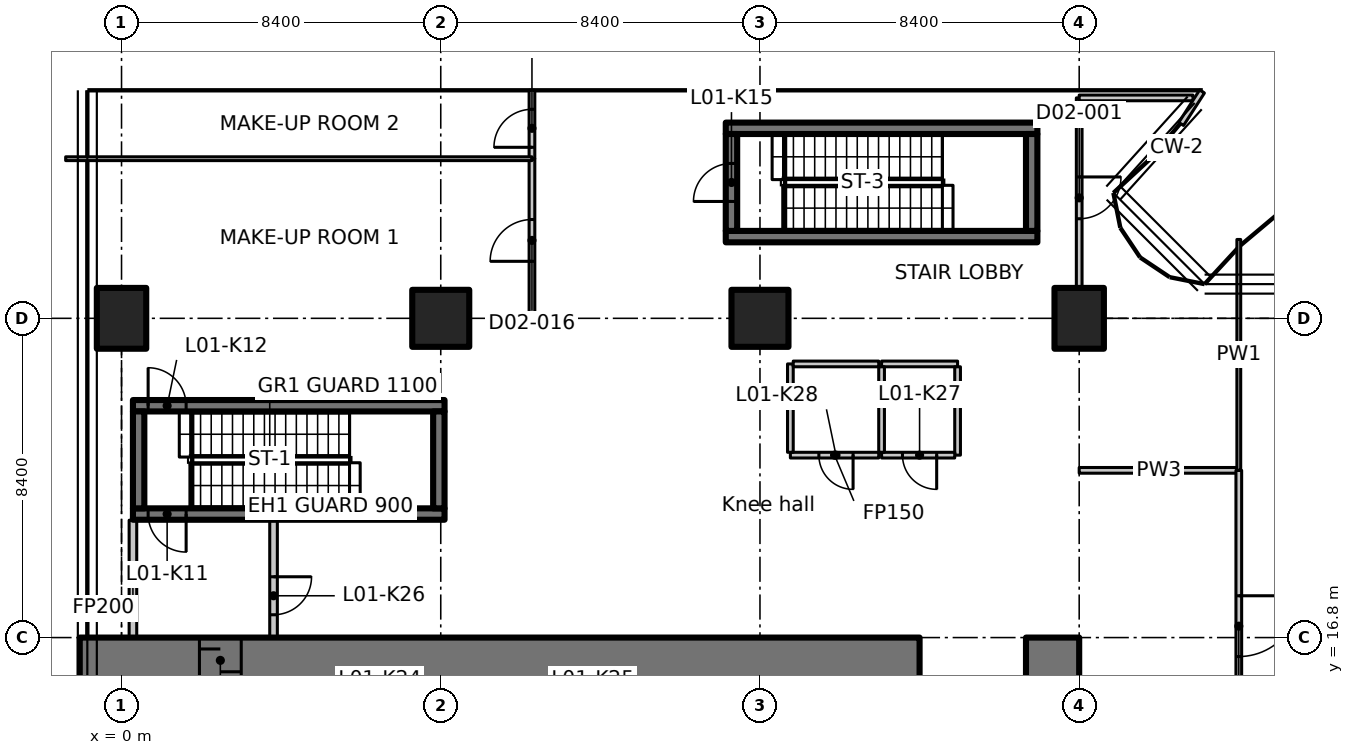
"""IFC4 building model, lengths in metres.
Left out: names, types, materials, properties, quantities, classifications, styles, units other than length and angle.
Written with IfcOpenShell. Run it as: python <this file> out.ifc"""

import sys

from ifc_helpers import new_model, si_unit, direction, frame, frame_2d, origin, origin_2d, place, context, subcontext, project, spatial, polyline, rectangle, outline, extrude, element, fill, save


model = new_model("IFC4")
c1 = context("Model", 3, precision=1e-05, world=origin(), true_north=direction((0.0, 1.0)))
c2 = subcontext(c1, "Body", "Model", "MODEL_VIEW")
j1 = project(units=[si_unit("LENGTHUNIT", "METRE"), si_unit("PLANEANGLEUNIT", "RADIAN")], contexts=[c1])
p1 = place(None, origin())
s1 = spatial("IfcSite", under=j1, at=p1, CompositionType="ELEMENT")
p2 = place(p1, origin())
s2 = spatial("IfcBuilding", under=s1, at=p2, CompositionType="ELEMENT")
p3 = place(p2, frame((0.0, 0.0, 7.0)))
s3 = spatial("IfcBuildingStorey", under=s2, at=p3, CompositionType="ELEMENT", Elevation=7.0)
p4 = place(p3, frame((0.0, 25.2, 0.0), z_axis=(0.0, 0.0, 1.0), x_axis=(1.0, 0.0, 0.0)))
e1 = element("IfcColumn", 1, at=p4, inside=s3, PredefinedType="COLUMN", context=c2, shape_type="SweptSolid", body=[
    extrude(rectangle(XDim=1.3, YDim=1.6, at=origin_2d()), origin(), (0.0, 0.0, 1.0), 5.25),
])
for number, where, z_axis, x_axis in (
    (2, (8.4, 25.2, 0.0), (0.0, 0.0, 1.0), (1.0, 0.0, 0.0)),
    (3, (16.8, 25.2, 0.0), (0.0, 0.0, 1.0), (1.0, 0.0, 0.0)),
):
    element("IfcColumn", number, at=place(p3, frame(where, z_axis=z_axis, x_axis=x_axis)), inside=s3, PredefinedType="COLUMN", context=c2, shape_type="SweptSolid", body=[
        extrude(rectangle(XDim=1.5, YDim=1.5, at=origin_2d()), origin(), (0.0, 0.0, 1.0), 5.25),
    ])
p5 = place(p3, frame((25.2, 25.2, 0.0), z_axis=(0.0, 0.0, 1.0), x_axis=(1.0, 0.0, 0.0)))
e4 = element("IfcColumn", 4, at=p5, inside=s3, PredefinedType="COLUMN", context=c2, shape_type="SweptSolid", body=[
    extrude(rectangle(XDim=1.3, YDim=1.6, at=origin_2d()), origin(), (0.0, 0.0, 1.0), 5.25),
])
p6 = place(p2, origin())
s4 = spatial("IfcBuildingStorey", under=s2, at=p6, CompositionType="ELEMENT", Elevation=0.0)
for number, where, z_axis, x_axis in (
    (5, (0.6, 32.4, -6.3), (0.0, 0.0, 1.0), (1.0, 0.0, 0.0)),
    (6, (9.0, 32.4, -6.3), (0.0, 0.0, 1.0), (1.0, 0.0, 0.0)),
):
    element("IfcWall", number, at=place(p6, frame(where, z_axis=z_axis, x_axis=x_axis)), inside=s4, PredefinedType="SOLIDWALL", context=c2, shape_type="SweptSolid", body=[
        extrude(rectangle(XDim=7.2, YDim=2.4, at=frame_2d((3.6, 0.0))), origin(), (0.0, 0.0, 1.0), 42.55),
    ])
p7 = place(p6, frame((17.4, 32.4, -6.3), z_axis=(0.0, 0.0, 1.0), x_axis=(1.0, 0.0, 0.0)))
e7 = element("IfcWall", 7, at=p7, inside=s4, PredefinedType="SOLIDWALL", context=c2, shape_type="SweptSolid", body=[
    extrude(rectangle(XDim=7.2, YDim=2.4, at=frame_2d((3.6, 0.0))), origin(), (0.0, 0.0, 1.0), 42.55),
])
p8 = place(p3, frame((-1.1, 16.2, 0.0), z_axis=(0.0, 0.0, 1.0), x_axis=(1.0, 0.0, 0.0)))
e8 = element("IfcWall", 8, at=p8, inside=s3, PredefinedType="SHEAR", context=c2, shape_type="SweptSolid", body=[
    extrude(rectangle(XDim=22.1, YDim=1.2, at=frame_2d((11.05, 0.0))), origin(), (0.0, 0.0, 1.0), 5.25),
])
p9 = place(p8, frame((3.15, 0.0, 0.0)))
e9 = element("IfcOpeningElement", 9, at=p9, cuts=e8, PredefinedType="OPENING", context=c2, shape_type="SweptSolid", body=[
    extrude(rectangle(XDim=1.1, YDim=2.3, at=frame_2d((0.55, 1.15))), frame((0.0, 0.61, 0.0), z_axis=(0.0, -1.0, 0.0), x_axis=(1.0, 0.0, 0.0)), (0.0, 0.0, 1.0), 1.22),
])
p10 = place(p3, frame((23.8, 16.2, 0.0), z_axis=(0.0, 0.0, 1.0), x_axis=(1.0, 0.0, 0.0)))
e10 = element("IfcWall", 10, at=p10, inside=s3, PredefinedType="SHEAR", context=c2, shape_type="SweptSolid", body=[
    extrude(rectangle(XDim=1.4, YDim=1.2, at=frame_2d((0.7, 0.0))), origin(), (0.0, 0.0, 1.0), 5.25),
])
p11 = place(p3, frame((8.5, 20.05, 0.0), z_axis=(0.0, 0.0, 1.0), x_axis=(-1.0, 0.0, 0.0)))
e11 = element("IfcWall", 11, at=p11, inside=s3, PredefinedType="SHEAR", context=c2, shape_type="SweptSolid", body=[
    extrude(rectangle(XDim=8.2, YDim=0.3, at=frame_2d((4.1, 0.0))), origin(), (0.0, 0.0, 1.0), 5.25),
])
p12 = place(p11, frame((6.8, 0.0, 0.0)))
e12 = element("IfcOpeningElement", 12, at=p12, cuts=e11, PredefinedType="OPENING", context=c2, shape_type="SweptSolid", body=[
    extrude(rectangle(XDim=1.0, YDim=2.1, at=frame_2d((0.5, 1.05))), frame((0.0, 0.16, 0.0), z_axis=(0.0, -1.0, 0.0), x_axis=(1.0, 0.0, 0.0)), (0.0, 0.0, 1.0), 0.32),
])
p13 = place(p3, frame((0.3, 22.9, 0.0), z_axis=(0.0, 0.0, 1.0), x_axis=(1.0, 0.0, 0.0)))
e13 = element("IfcWall", 13, at=p13, inside=s3, PredefinedType="SHEAR", context=c2, shape_type="SweptSolid", body=[
    extrude(rectangle(XDim=8.2, YDim=0.3, at=frame_2d((4.1, 0.0))), origin(), (0.0, 0.0, 1.0), 5.25),
])
p14 = place(p13, frame((0.4, 0.0, 0.0)))
e14 = element("IfcOpeningElement", 14, at=p14, cuts=e13, PredefinedType="OPENING", context=c2, shape_type="SweptSolid", body=[
    extrude(rectangle(XDim=1.0, YDim=2.1, at=frame_2d((0.5, 1.05))), frame((0.0, 0.16, 0.0), z_axis=(0.0, -1.0, 0.0), x_axis=(1.0, 0.0, 0.0)), (0.0, 0.0, 1.0), 0.32),
])
for number, where, z_axis, x_axis in (
    (15, (0.45, 20.2, 0.0), (0.0, 0.0, 1.0), (0.0, 1.0, 0.0)),
    (16, (8.35, 20.2, 0.0), (0.0, 0.0, 1.0), (0.0, 1.0, 0.0)),
):
    element("IfcWall", number, at=place(p3, frame(where, z_axis=z_axis, x_axis=x_axis)), inside=s3, PredefinedType="SHEAR", context=c2, shape_type="SweptSolid", body=[
        extrude(rectangle(XDim=2.55, YDim=0.3, at=frame_2d((1.275, 0.0))), origin(), (0.0, 0.0, 1.0), 5.25),
    ])
for number, where, z_axis, x_axis in (
    (17, (15.9, 27.35, 0.0), (0.0, 0.0, 1.0), (1.0, 0.0, 0.0)),
    (18, (15.9, 30.2, 0.0), (0.0, 0.0, 1.0), (1.0, 0.0, 0.0)),
):
    element("IfcWall", number, at=place(p3, frame(where, z_axis=z_axis, x_axis=x_axis)), inside=s3, PredefinedType="SHEAR", context=c2, shape_type="SweptSolid", body=[
        extrude(rectangle(XDim=8.2, YDim=0.3, at=frame_2d((4.1, 0.0))), origin(), (0.0, 0.0, 1.0), 5.25),
    ])
p15 = place(p3, frame((16.05, 27.5, 0.0), z_axis=(0.0, 0.0, 1.0), x_axis=(0.0, 1.0, 0.0)))
e19 = element("IfcWall", 19, at=p15, inside=s3, PredefinedType="SHEAR", context=c2, shape_type="SweptSolid", body=[
    extrude(rectangle(XDim=2.55, YDim=0.3, at=frame_2d((1.275, 0.0))), origin(), (0.0, 0.0, 1.0), 5.25),
])
p16 = place(p15, frame((0.775, 0.0, 0.0)))
e20 = element("IfcOpeningElement", 20, at=p16, cuts=e19, PredefinedType="OPENING", context=c2, shape_type="SweptSolid", body=[
    extrude(rectangle(XDim=1.0, YDim=2.1, at=frame_2d((0.5, 1.05))), frame((0.0, 0.16, 0.0), z_axis=(0.0, -1.0, 0.0), x_axis=(1.0, 0.0, 0.0)), (0.0, 0.0, 1.0), 0.32),
])
p17 = place(p3, frame((23.95, 27.5, 0.0), z_axis=(0.0, 0.0, 1.0), x_axis=(0.0, 1.0, 0.0)))
e21 = element("IfcWall", 21, at=p17, inside=s3, PredefinedType="SHEAR", context=c2, shape_type="SweptSolid", body=[
    extrude(rectangle(XDim=2.55, YDim=0.3, at=frame_2d((1.275, 0.0))), origin(), (0.0, 0.0, 1.0), 5.25),
])
p18 = place(p3, frame((0.3, 16.812, 0.0), z_axis=(0.0, 0.0, 1.0), x_axis=(0.0, 1.0, 0.0)))
e22 = element("IfcWall", 22, at=p18, inside=s3, PredefinedType="PARTITIONING", context=c2, shape_type="SweptSolid", body=[
    extrude(rectangle(XDim=3.076, YDim=0.2, at=frame_2d((1.538, 0.0))), origin(), (0.0, 0.0, 1.0), 4.88),
])
p19 = place(p3, frame((4.0, 19.888, 0.0), z_axis=(0.0, 0.0, 1.0), x_axis=(0.0, -1.0, 0.0)))
e23 = element("IfcWall", 23, at=p19, inside=s3, PredefinedType="PARTITIONING", context=c2, shape_type="SweptSolid", body=[
    extrude(rectangle(XDim=3.076, YDim=0.2, at=frame_2d((1.538, 0.0))), origin(), (0.0, 0.0, 1.0), 5.25),
])
p20 = place(p19, frame((1.488, 0.0, 0.0)))
e24 = element("IfcOpeningElement", 24, at=p20, cuts=e23, PredefinedType="OPENING", context=c2, shape_type="SweptSolid", body=[
    extrude(rectangle(XDim=1.0, YDim=2.1, at=frame_2d((0.5, 1.05))), frame((0.0, 0.11, 0.0), z_axis=(0.0, -1.0, 0.0), x_axis=(1.0, 0.0, 0.0)), (0.0, 0.0, 1.0), 0.22),
])
p21 = place(p3, frame((20.0, 24.0, 0.0), z_axis=(0.0, 0.0, 1.0), x_axis=(1.0, 0.0, 0.0)))
e25 = element("IfcWall", 25, at=p21, inside=s3, PredefinedType="PARTITIONING", context=c2, shape_type="SweptSolid", body=[
    extrude(rectangle(XDim=2.0, YDim=0.15, at=frame_2d((1.0, 0.0))), origin(), (0.0, 0.0, 1.0), 5.25),
])
p22 = place(p3, frame((22.0, 23.925, 0.0), z_axis=(0.0, 0.0, 1.0), x_axis=(0.0, -1.0, 0.0)))
e26 = element("IfcWall", 26, at=p22, inside=s3, PredefinedType="PARTITIONING", context=c2, shape_type="SweptSolid", body=[
    extrude(rectangle(XDim=2.325, YDim=0.15, at=frame_2d((1.163, 0.0))), origin(), (0.0, 0.0, 1.0), 5.25),
])
p23 = place(p3, frame((21.925, 21.6, 0.0), z_axis=(0.0, 0.0, 1.0), x_axis=(-1.0, 0.0, 0.0)))
e27 = element("IfcWall", 27, at=p23, inside=s3, PredefinedType="PARTITIONING", context=c2, shape_type="SweptSolid", body=[
    extrude(rectangle(XDim=1.925, YDim=0.15, at=frame_2d((0.962, 0.0))), origin(), (0.0, 0.0, 1.0), 5.25),
])
p24 = place(p23, frame((0.475, 0.0, 0.0)))
e28 = element("IfcOpeningElement", 28, at=p24, cuts=e27, PredefinedType="OPENING", context=c2, shape_type="SweptSolid", body=[
    extrude(rectangle(XDim=0.9, YDim=2.1, at=frame_2d((0.45, 1.05))), frame((0.0, 0.085, 0.0), z_axis=(0.0, -1.0, 0.0), x_axis=(1.0, 0.0, 0.0)), (0.0, 0.0, 1.0), 0.17),
])
p25 = place(p3, frame((20.0, 21.675, 0.0), z_axis=(0.0, 0.0, 1.0), x_axis=(0.0, 1.0, 0.0)))
e29 = element("IfcWall", 29, at=p25, inside=s3, PredefinedType="PARTITIONING", context=c2, shape_type="SweptSolid", body=[
    extrude(rectangle(XDim=2.25, YDim=0.15, at=frame_2d((1.125, 0.0))), origin(), (0.0, 0.0, 1.0), 5.25),
])
p26 = place(p3, frame((19.925, 21.6, 0.0), z_axis=(0.0, 0.0, 1.0), x_axis=(-1.0, 0.0, 0.0)))
e30 = element("IfcWall", 30, at=p26, inside=s3, PredefinedType="PARTITIONING", context=c2, shape_type="SweptSolid", body=[
    extrude(rectangle(XDim=2.325, YDim=0.15, at=frame_2d((1.163, 0.0))), origin(), (0.0, 0.0, 1.0), 5.25),
])
p27 = place(p26, frame((0.675, 0.0, 0.0)))
e31 = element("IfcOpeningElement", 31, at=p27, cuts=e30, PredefinedType="OPENING", context=c2, shape_type="SweptSolid", body=[
    extrude(rectangle(XDim=0.9, YDim=2.1, at=frame_2d((0.45, 1.05))), frame((0.0, 0.085, 0.0), z_axis=(0.0, -1.0, 0.0), x_axis=(1.0, 0.0, 0.0)), (0.0, 0.0, 1.0), 0.17),
])
p28 = place(p3, frame((17.6, 21.675, 0.0), z_axis=(0.0, 0.0, 1.0), x_axis=(0.0, 1.0, 0.0)))
e32 = element("IfcWall", 32, at=p28, inside=s3, PredefinedType="PARTITIONING", context=c2, shape_type="SweptSolid", body=[
    extrude(rectangle(XDim=2.325, YDim=0.15, at=frame_2d((1.163, 0.0))), origin(), (0.0, 0.0, 1.0), 5.25),
])
p29 = place(p3, frame((17.675, 24.0, 0.0), z_axis=(0.0, 0.0, 1.0), x_axis=(1.0, 0.0, 0.0)))
e33 = element("IfcWall", 33, at=p29, inside=s3, PredefinedType="PARTITIONING", context=c2, shape_type="SweptSolid", body=[
    extrude(rectangle(XDim=2.25, YDim=0.15, at=frame_2d((1.125, 0.0))), origin(), (0.0, 0.0, 1.0), 5.25),
])
p30 = place(p3, frame((25.2, 21.2, 0.0), z_axis=(0.0, 0.0, 1.0), x_axis=(1.0, 0.0, 0.0)))
e34 = element("IfcWall", 34, at=p30, inside=s3, PredefinedType="PARTITIONING", context=c2, shape_type="SweptSolid", body=[
    extrude(rectangle(XDim=4.2, YDim=0.15, at=frame_2d((2.1, 0.0))), origin(), (0.0, 0.0, 1.0), 5.23),
])
p31 = place(p3, frame((29.4, 21.2, 0.0), z_axis=(0.0, 0.0, 1.0), x_axis=(0.0, -1.0, 0.0)))
e35 = element("IfcWall", 35, at=p31, inside=s3, PredefinedType="PARTITIONING", context=c2, shape_type="SweptSolid", body=[
    extrude(rectangle(XDim=8.2, YDim=0.15, at=frame_2d((4.1, 0.0))), origin(), (0.0, 0.0, 1.0), 5.23),
])
p32 = place(p31, frame((3.3, 0.0, 0.0)))
e36 = element("IfcOpeningElement", 36, at=p32, cuts=e35, PredefinedType="OPENING", context=c2, shape_type="SweptSolid", body=[
    extrude(rectangle(XDim=1.6, YDim=2.1, at=frame_2d((0.8, 1.05))), frame((0.0, 0.085, 0.0), z_axis=(0.0, -1.0, 0.0), x_axis=(1.0, 0.0, 0.0)), (0.0, 0.0, 1.0), 0.17),
])
p33 = place(p3, frame((29.4, 27.275, 0.0), z_axis=(0.0, 0.0, 1.0), x_axis=(0.0, -1.0, 0.0)))
e37 = element("IfcWall", 37, at=p33, inside=s3, PredefinedType="PARTITIONING", context=c2, shape_type="SweptSolid", body=[
    extrude(outline(polyline([(0.0, 0.0), (6.075, 0.0), (6.075, 5.23), (2.525, 5.23), (2.523, 4.88), (1.627, 4.88), (1.625, 5.23), (0.0, 5.23), (0.0, 0.0)])), frame((0.0, 0.05, 0.0), z_axis=(0.0, -1.0, 0.0), x_axis=(1.0, 0.0, 0.0)), (0.0, 0.0, 1.0), 0.1),
])
p34 = place(p3, frame((25.2, 31.0, 0.0), z_axis=(0.0, 0.0, 1.0), x_axis=(0.0, -1.0, 0.0)))
e38 = element("IfcWall", 38, at=p34, inside=s3, PredefinedType="PARTITIONING", context=c2, shape_type="SweptSolid", body=[
    extrude(rectangle(XDim=4.98, YDim=0.15, at=frame_2d((2.49, 0.0))), origin(), (0.0, 0.0, 1.0), 5.23),
])
p35 = place(p34, frame((2.08, 0.0, 0.0)))
e39 = element("IfcOpeningElement", 39, at=p35, cuts=e38, PredefinedType="OPENING", context=c2, shape_type="SweptSolid", body=[
    extrude(rectangle(XDim=1.1, YDim=2.1, at=frame_2d((0.55, 1.05))), frame((0.0, 0.085, 0.0), z_axis=(0.0, -1.0, 0.0), x_axis=(1.0, 0.0, 0.0)), (0.0, 0.0, 1.0), 0.17),
])
p36 = place(p3, frame((25.2, 31.0, 0.0), z_axis=(0.0, 0.0, 1.0), x_axis=(1.0, 0.0, 0.0)))
e40 = element("IfcWall", 40, at=p36, inside=s3, PredefinedType="PARTITIONING", context=c2, shape_type="SweptSolid", body=[
    extrude(rectangle(XDim=2.994, YDim=0.15, at=frame_2d((1.497, 0.0))), origin(), (0.0, 0.0, 1.0), 5.23),
])
p37 = place(p3, frame((28.432, 31.168, 0.0), z_axis=(0.0, 0.0, 1.0), x_axis=(-0.540854867502, -0.841115932734, 0.0)))
e41 = element("IfcWall", 41, at=p37, inside=s3, PredefinedType="PARTITIONING", context=c2, shape_type="SweptSolid", body=[
    extrude(rectangle(XDim=1.015, YDim=0.15, at=frame_2d((0.507, 0.0))), origin(), (0.0, 0.0, 1.0), 5.23),
])
p38 = place(p3, frame((10.8, 25.2, 0.0), z_axis=(0.0, 0.0, 1.0), x_axis=(0.0, 1.0, 0.0)))
e42 = element("IfcWall", 42, at=p38, inside=s3, PredefinedType="PARTITIONING", context=c2, shape_type="SweptSolid", body=[
    extrude(rectangle(XDim=4.2, YDim=0.15, at=frame_2d((2.1, 0.0))), origin(), (0.0, 0.0, 1.0), 5.23),
])
p39 = place(p38, frame((1.5, 0.0, 0.0)))
e43 = element("IfcOpeningElement", 43, at=p39, cuts=e42, PredefinedType="OPENING", context=c2, shape_type="SweptSolid", body=[
    extrude(rectangle(XDim=1.1, YDim=2.1, at=frame_2d((0.55, 1.05))), frame((0.0, 0.085, 0.0), z_axis=(0.0, -1.0, 0.0), x_axis=(1.0, 0.0, 0.0)), (0.0, 0.0, 1.0), 0.17),
])
p40 = place(p3, frame((10.8, 29.4, 0.0), z_axis=(0.0, 0.0, 1.0), x_axis=(0.0, 1.0, 0.0)))
e44 = element("IfcWall", 44, at=p40, inside=s3, PredefinedType="PARTITIONING", context=c2, shape_type="SweptSolid", body=[
    extrude(rectangle(XDim=1.8, YDim=0.15, at=frame_2d((0.9, 0.0))), origin(), (0.0, 0.0, 1.0), 5.23),
])
p41 = place(p40, frame((0.3, 0.0, 0.0)))
e45 = element("IfcOpeningElement", 45, at=p41, cuts=e44, PredefinedType="OPENING", context=c2, shape_type="SweptSolid", body=[
    extrude(rectangle(XDim=1.0, YDim=2.1, at=frame_2d((0.5, 1.05))), frame((0.0, 0.085, 0.0), z_axis=(0.0, -1.0, 0.0), x_axis=(1.0, 0.0, 0.0)), (0.0, 0.0, 1.0), 0.17),
])
p42 = place(p3, frame((-1.47, 29.4, 0.0), z_axis=(0.0, 0.0, 1.0), x_axis=(1.0, 0.0, 0.0)))
e46 = element("IfcWall", 46, at=p42, inside=s3, PredefinedType="PARTITIONING", context=c2, shape_type="SweptSolid", body=[
    extrude(rectangle(XDim=12.27, YDim=0.1, at=frame_2d((6.135, 0.0))), origin(), (0.0, 0.0, 1.0), 5.23),
])
p43 = place(p9, origin())
e47 = element("IfcDoor", 47, at=p43, inside=s3, OperationType="SLIDING_TO_LEFT", PredefinedType="DOOR", context=c2, shape_type="SweptSolid", body=[
    extrude(rectangle(XDim=1.1, YDim=2.3, at=frame_2d((0.55, 1.15))), frame((0.0, 0.025, 0.0), z_axis=(0.0, -1.0, 0.0), x_axis=(1.0, 0.0, 0.0)), (0.0, 0.0, 1.0), 0.05),
])
fill(e9, e47)
p44 = place(p12, origin())
e48 = element("IfcDoor", 48, at=p44, inside=s3, OperationType="SINGLE_SWING_LEFT", PredefinedType="DOOR", context=c2, shape_type="SweptSolid", body=[
    extrude(rectangle(XDim=1.0, YDim=2.1, at=frame_2d((0.5, 1.05))), frame((0.0, 0.025, 0.0), z_axis=(0.0, -1.0, 0.0), x_axis=(1.0, 0.0, 0.0)), (0.0, 0.0, 1.0), 0.05),
])
fill(e12, e48)
p45 = place(p14, origin())
e49 = element("IfcDoor", 49, at=p45, inside=s3, OperationType="SINGLE_SWING_RIGHT", PredefinedType="DOOR", context=c2, shape_type="SweptSolid", body=[
    extrude(rectangle(XDim=1.0, YDim=2.1, at=frame_2d((0.5, 1.05))), frame((0.0, 0.025, 0.0), z_axis=(0.0, -1.0, 0.0), x_axis=(1.0, 0.0, 0.0)), (0.0, 0.0, 1.0), 0.05),
])
fill(e14, e49)
p46 = place(p16, origin())
e50 = element("IfcDoor", 50, at=p46, inside=s3, OperationType="SINGLE_SWING_LEFT", PredefinedType="DOOR", context=c2, shape_type="SweptSolid", body=[
    extrude(rectangle(XDim=1.0, YDim=2.1, at=frame_2d((0.5, 1.05))), frame((0.0, 0.025, 0.0), z_axis=(0.0, -1.0, 0.0), x_axis=(1.0, 0.0, 0.0)), (0.0, 0.0, 1.0), 0.05),
])
fill(e20, e50)
p47 = place(p20, origin())
e51 = element("IfcDoor", 51, at=p47, inside=s3, OperationType="SINGLE_SWING_RIGHT", PredefinedType="DOOR", context=c2, shape_type="SweptSolid", body=[
    extrude(rectangle(XDim=1.0, YDim=2.1, at=frame_2d((0.5, 1.05))), frame((0.0, 0.025, 0.0), z_axis=(0.0, -1.0, 0.0), x_axis=(1.0, 0.0, 0.0)), (0.0, 0.0, 1.0), 0.05),
])
fill(e24, e51)
p48 = place(p24, origin())
e52 = element("IfcDoor", 52, at=p48, inside=s3, OperationType="SINGLE_SWING_LEFT", PredefinedType="DOOR", context=c2, shape_type="SweptSolid", body=[
    extrude(rectangle(XDim=0.9, YDim=2.1, at=frame_2d((0.45, 1.05))), frame((0.0, 0.025, 0.0), z_axis=(0.0, -1.0, 0.0), x_axis=(1.0, 0.0, 0.0)), (0.0, 0.0, 1.0), 0.05),
])
fill(e28, e52)
p49 = place(p27, origin())
e53 = element("IfcDoor", 53, at=p49, inside=s3, OperationType="SINGLE_SWING_RIGHT", PredefinedType="DOOR", context=c2, shape_type="SweptSolid", body=[
    extrude(rectangle(XDim=0.9, YDim=2.1, at=frame_2d((0.45, 1.05))), frame((0.0, 0.025, 0.0), z_axis=(0.0, -1.0, 0.0), x_axis=(1.0, 0.0, 0.0)), (0.0, 0.0, 1.0), 0.05),
])
fill(e31, e53)
p50 = place(p35, origin())
e54 = element("IfcDoor", 54, at=p50, inside=s3, OperationType="SINGLE_SWING_RIGHT", PredefinedType="DOOR", context=c2, shape_type="SweptSolid", body=[
    extrude(rectangle(XDim=1.1, YDim=2.1, at=frame_2d((0.55, 1.05))), frame((0.0, 0.025, 0.0), z_axis=(0.0, -1.0, 0.0), x_axis=(1.0, 0.0, 0.0)), (0.0, 0.0, 1.0), 0.05),
])
fill(e39, e54)
p51 = place(p32, origin())
e55 = element("IfcDoor", 55, at=p51, inside=s3, OperationType="DOUBLE_DOOR_SINGLE_SWING", PredefinedType="DOOR", context=c2, shape_type="SweptSolid", body=[
    extrude(rectangle(XDim=1.6, YDim=2.1, at=frame_2d((0.8, 1.05))), frame((0.0, 0.025, 0.0), z_axis=(0.0, -1.0, 0.0), x_axis=(1.0, 0.0, 0.0)), (0.0, 0.0, 1.0), 0.05),
])
fill(e36, e55)
p52 = place(p39, origin())
e56 = element("IfcDoor", 56, at=p52, inside=s3, OperationType="SINGLE_SWING_LEFT", PredefinedType="DOOR", context=c2, shape_type="SweptSolid", body=[
    extrude(rectangle(XDim=1.1, YDim=2.1, at=frame_2d((0.55, 1.05))), frame((0.0, 0.025, 0.0), z_axis=(0.0, -1.0, 0.0), x_axis=(1.0, 0.0, 0.0)), (0.0, 0.0, 1.0), 0.05),
])
fill(e43, e56)
p53 = place(p41, origin())
e57 = element("IfcDoor", 57, at=p53, inside=s3, OperationType="SINGLE_SWING_LEFT", PredefinedType="DOOR", context=c2, shape_type="SweptSolid", body=[
    extrude(rectangle(XDim=1.0, YDim=2.1, at=frame_2d((0.5, 1.05))), frame((0.0, 0.025, 0.0), z_axis=(0.0, -1.0, 0.0), x_axis=(1.0, 0.0, 0.0)), (0.0, 0.0, 1.0), 0.05),
])
fill(e45, e57)
save(model, sys.argv[1])
